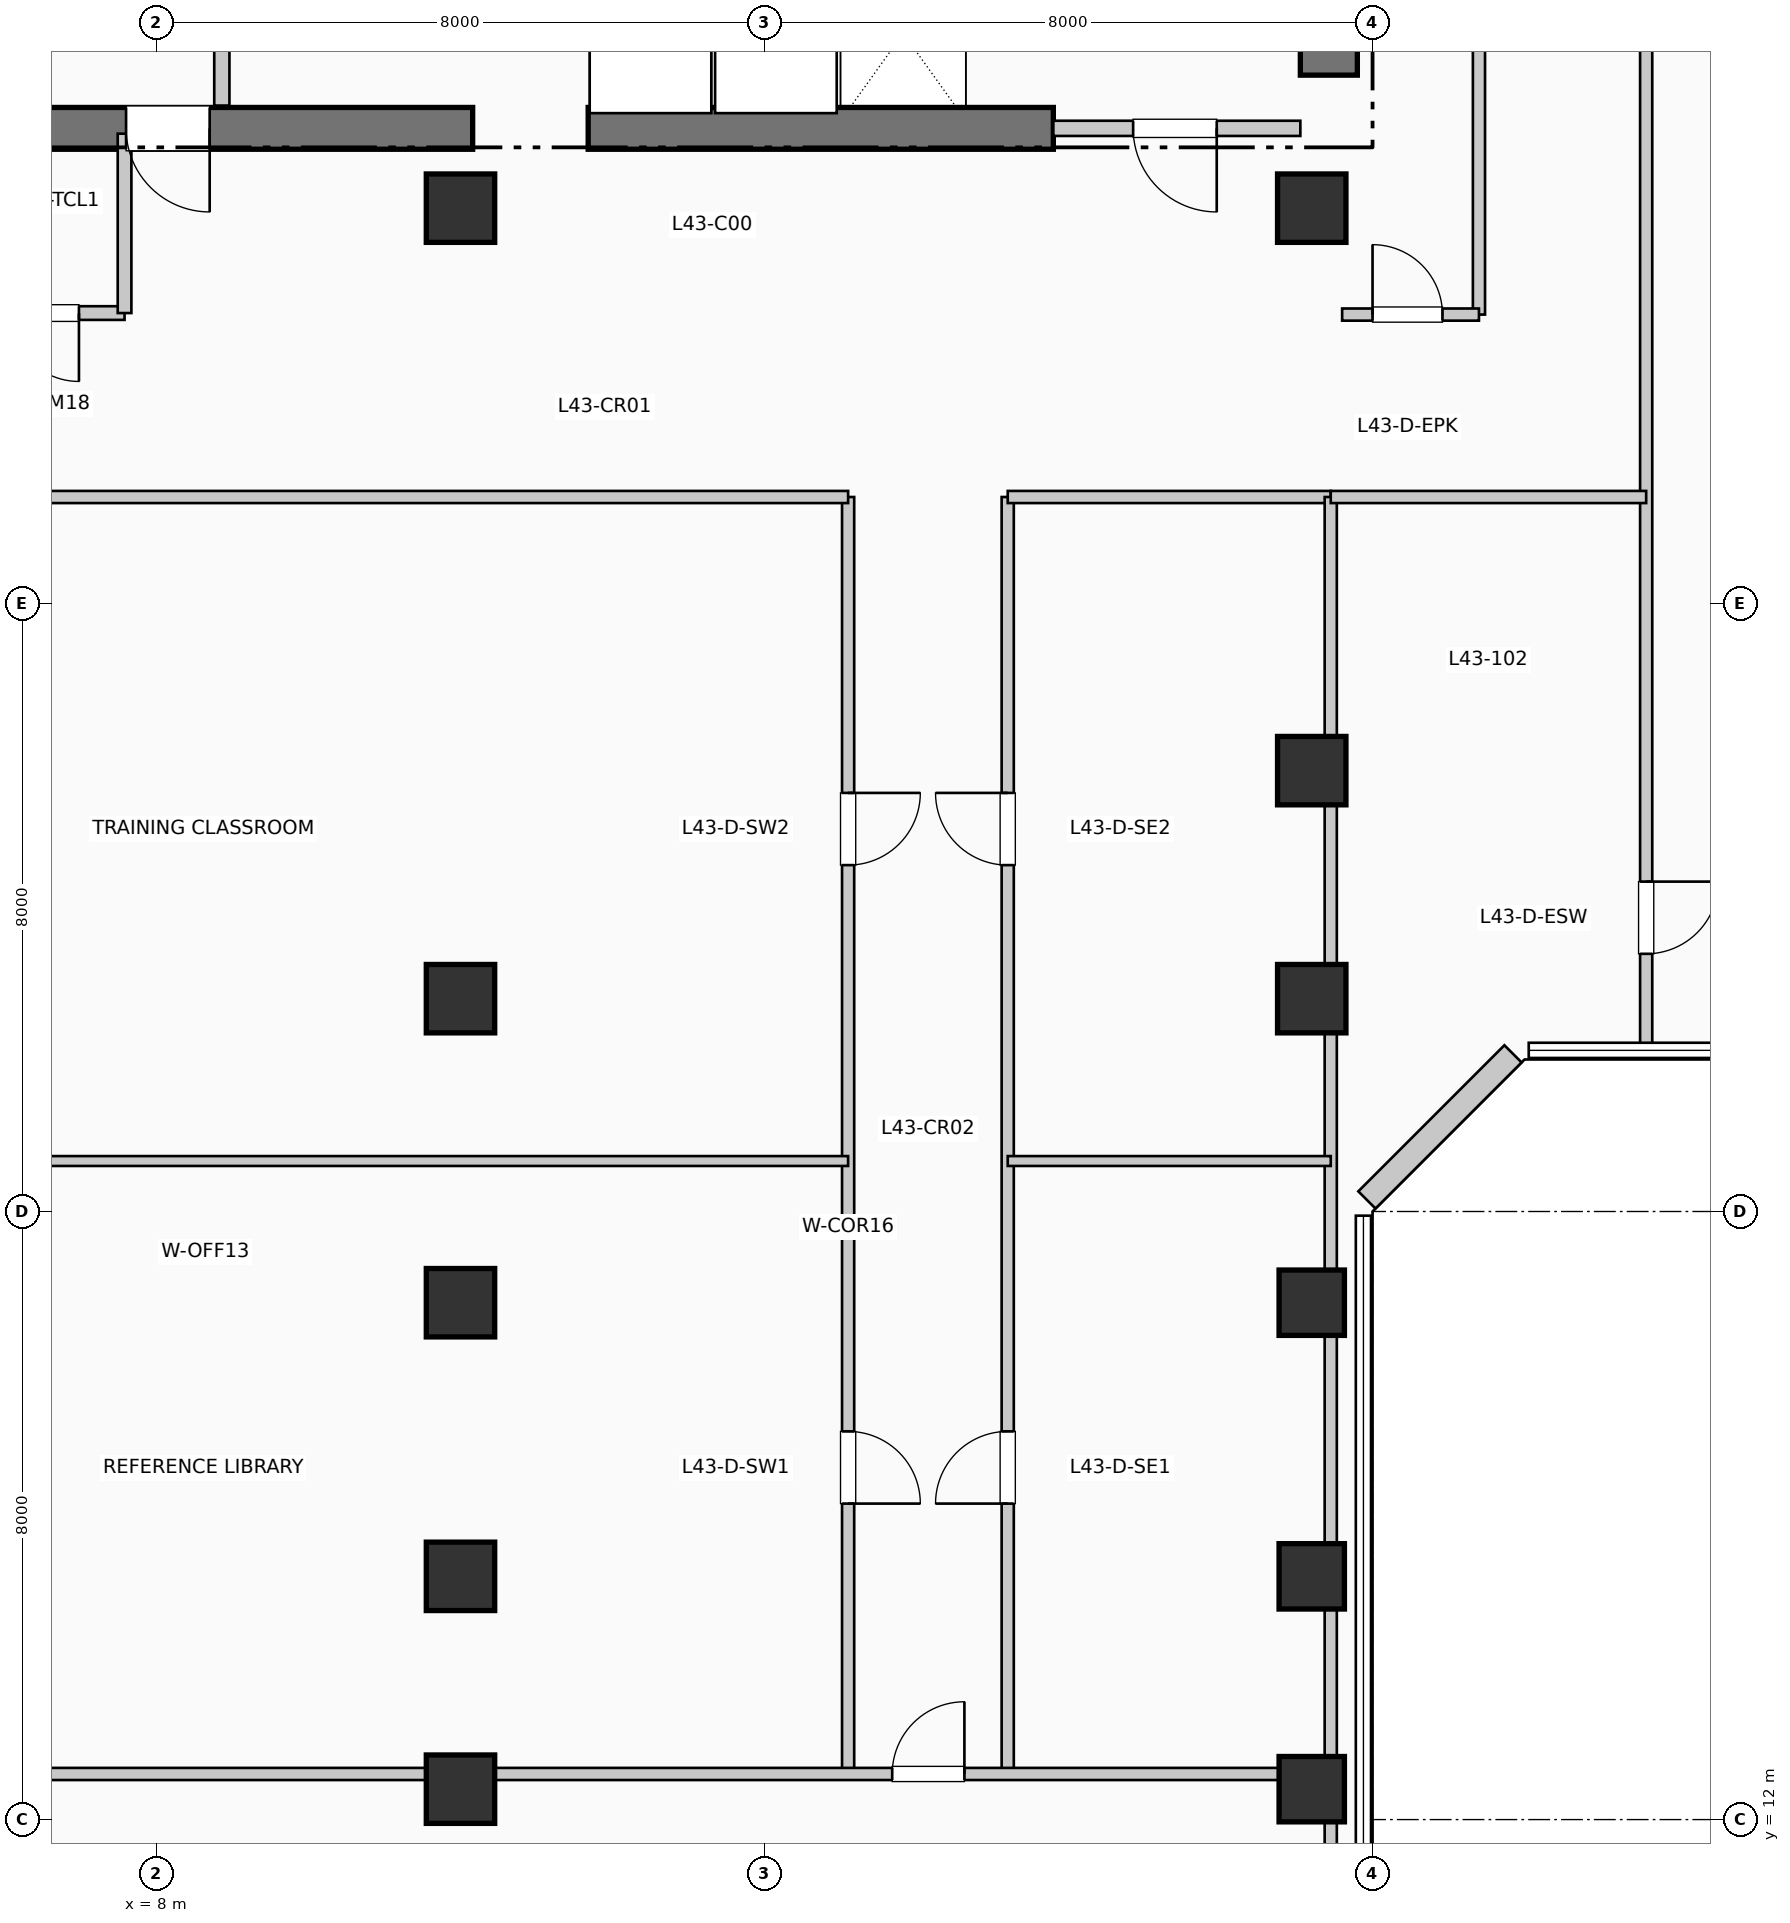
"""IFC4 building model, lengths in metres.
Left out: names, types, materials, properties, quantities, classifications, styles, units other than length and angle.
Written with IfcOpenShell. Run it as: python <this file> out.ifc"""

import sys

from ifc_helpers import new_model, si_unit, direction, frame, frame_2d, origin, origin_2d, place, context, subcontext, project, spatial, rectangle, extrude, element, fill, save


model = new_model("IFC4")
c1 = context("Model", 3, precision=1e-05, world=origin(), true_north=direction((0.0, 1.0)))
c2 = subcontext(c1, "Body", "Model", "MODEL_VIEW")
j1 = project(units=[si_unit("LENGTHUNIT", "METRE"), si_unit("PLANEANGLEUNIT", "RADIAN")], contexts=[c1])
p1 = place(None, origin())
s1 = spatial("IfcSite", under=j1, at=p1, CompositionType="ELEMENT")
p2 = place(p1, origin())
s2 = spatial("IfcBuilding", under=s1, at=p2, CompositionType="ELEMENT")
p3 = place(p2, frame((0.0, 0.0, 179.52)))
s3 = spatial("IfcBuildingStorey", under=s2, at=p3, CompositionType="ELEMENT", Elevation=179.52)
p4 = place(p3, frame((23.425, 34.95, 0.0), z_axis=(0.0, 0.0, 1.0), x_axis=(0.0, 1.0, 0.0)))
e1 = element("IfcWall", 1, at=p4, inside=s3, PredefinedType="SHEAR", context=c2, shape_type="SweptSolid", body=[
    extrude(rectangle(XDim=10.64, YDim=0.75, at=frame_2d((5.32, 0.0))), origin(), (0.0, 0.0, 1.0), 3.96),
])
p5 = place(p3, frame((1.45, 34.25, 0.0), z_axis=(0.0, 0.0, 1.0), x_axis=(1.0, 0.0, 0.0)))
e2 = element("IfcWall", 2, at=p5, inside=s3, PredefinedType="SHEAR", context=c2, shape_type="SweptSolid", body=[
    extrude(rectangle(XDim=10.71, YDim=0.55, at=frame_2d((5.355, 0.0))), origin(), (0.0, 0.0, 1.0), 3.96),
])
p6 = place(p5, frame((7.25, 0.0, 0.0), z_axis=(0.0, 0.0, 1.0), x_axis=(-1.0, 0.0, 0.0)))
e3 = element("IfcOpeningElement", 3, at=p6, cuts=e2, PredefinedType="OPENING", context=c2, shape_type="SweptSolid", body=[
    extrude(rectangle(XDim=1.1, YDim=2.15, at=frame_2d((0.55, 1.075))), frame((0.0, 0.285, 0.0), z_axis=(0.0, -1.0, 0.0), x_axis=(1.0, 0.0, 0.0)), (0.0, 0.0, 1.0), 0.57),
])
p7 = place(p3, frame((13.68, 34.25, 0.0), z_axis=(0.0, 0.0, 1.0), x_axis=(1.0, 0.0, 0.0)))
e4 = element("IfcWall", 4, at=p7, inside=s3, PredefinedType="SHEAR", context=c2, shape_type="SweptSolid", body=[
    extrude(rectangle(XDim=6.12, YDim=0.55, at=frame_2d((3.06, 0.0))), origin(), (0.0, 0.0, 1.0), 3.96),
])
for number, where, z_axis, x_axis in (
    (5, (12.0, 12.4, 0.0), (0.0, 0.0, 1.0), (1.0, 0.0, 0.0)),
    (6, (12.0, 15.2, 0.0), (0.0, 0.0, 1.0), (1.0, 0.0, 0.0)),
    (7, (12.0, 18.8, 0.0), (0.0, 0.0, 1.0), (1.0, 0.0, 0.0)),
    (8, (12.0, 22.8, 0.0), (0.0, 0.0, 1.0), (1.0, 0.0, 0.0)),
    (9, (12.0, 33.2, 0.0), (0.0, 0.0, 1.0), (1.0, 0.0, 0.0)),
):
    element("IfcColumn", number, at=place(p3, frame(where, z_axis=z_axis, x_axis=x_axis)), inside=s3, PredefinedType="COLUMN", context=c2, shape_type="SweptSolid", body=[
        extrude(rectangle(XDim=0.9, YDim=0.9, at=origin_2d()), origin(), (0.0, 0.0, 1.0), 3.96),
    ])
for number, where, z_axis, x_axis in (
    (10, (23.2, 12.4, 0.0), (0.0, 0.0, 1.0), (1.0, 0.0, 0.0)),
    (11, (23.2, 15.2, 0.0), (0.0, 0.0, 1.0), (1.0, 0.0, 0.0)),
    (12, (23.2, 18.8, 0.0), (0.0, 0.0, 1.0), (1.0, 0.0, 0.0)),
):
    element("IfcColumn", number, at=place(p3, frame(where, z_axis=z_axis, x_axis=x_axis)), inside=s3, PredefinedType="COLUMN", context=c2, shape_type="SweptSolid", body=[
        extrude(rectangle(XDim=0.86, YDim=0.86, at=origin_2d()), origin(), (0.0, 0.0, 1.0), 3.96),
    ])
for number, where, z_axis, x_axis in (
    (13, (23.2, 22.8, 0.0), (0.0, 0.0, 1.0), (1.0, 0.0, 0.0)),
    (14, (23.2, 25.8, 0.0), (0.0, 0.0, 1.0), (1.0, 0.0, 0.0)),
    (15, (23.2, 33.2, 0.0), (0.0, 0.0, 1.0), (1.0, 0.0, 0.0)),
):
    element("IfcColumn", number, at=place(p3, frame(where, z_axis=z_axis, x_axis=x_axis)), inside=s3, PredefinedType="COLUMN", context=c2, shape_type="SweptSolid", body=[
        extrude(rectangle(XDim=0.9, YDim=0.9, at=origin_2d()), origin(), (0.0, 0.0, 1.0), 3.96),
    ])
p8 = place(p3, frame((23.926, 20.152, 0.0), z_axis=(0.0, 0.0, 1.0), x_axis=(0.707106781187, 0.707106781187, 0.0)))
e16 = element("IfcWall", 16, at=p8, inside=s3, PredefinedType="SOLIDWALL", context=c2, shape_type="SweptSolid", body=[
    extrude(rectangle(XDim=2.718, YDim=0.32, at=frame_2d((1.359, 0.0))), origin(), (0.0, 0.0, 1.0), 3.71),
])
p9 = place(p3, frame((8.86, 34.55, 0.0), z_axis=(0.0, 0.0, 1.0), x_axis=(0.0, 1.0, 0.0)))
e17 = element("IfcWall", 17, at=p9, inside=s3, PredefinedType="PARTITIONING", context=c2, shape_type="SweptSolid", body=[
    extrude(rectangle(XDim=2.5, YDim=0.2, at=frame_2d((1.25, 0.0))), origin(), (0.0, 0.0, 1.0), 3.71),
])
p10 = place(p3, frame((19.8, 34.25, 0.0), z_axis=(0.0, 0.0, 1.0), x_axis=(1.0, 0.0, 0.0)))
e18 = element("IfcWall", 18, at=p10, inside=s3, PredefinedType="PARTITIONING", context=c2, shape_type="SweptSolid", body=[
    extrude(rectangle(XDim=3.25, YDim=0.2, at=frame_2d((1.625, 0.0))), origin(), (0.0, 0.0, 1.0), 3.71),
])
p11 = place(p10, frame((2.15, 0.0, 0.0), z_axis=(0.0, 0.0, 1.0), x_axis=(-1.0, 0.0, 0.0)))
e19 = element("IfcOpeningElement", 19, at=p11, cuts=e18, PredefinedType="OPENING", context=c2, shape_type="SweptSolid", body=[
    extrude(rectangle(XDim=1.1, YDim=2.15, at=frame_2d((0.55, 1.075))), frame((0.0, 0.11, 0.0), z_axis=(0.0, -1.0, 0.0), x_axis=(1.0, 0.0, 0.0)), (0.0, 0.0, 1.0), 0.22),
])
p12 = place(p3, frame((5.5, 31.82, 0.0), z_axis=(0.0, 0.0, 1.0), x_axis=(1.0, 0.0, 0.0)))
e20 = element("IfcWall", 20, at=p12, inside=s3, PredefinedType="PLUMBINGWALL", context=c2, shape_type="SweptSolid", body=[
    extrude(rectangle(XDim=2.08, YDim=0.18, at=frame_2d((1.04, 0.0))), origin(), (0.0, 0.0, 1.0), 3.71),
])
p13 = place(p12, frame((1.48, 0.0, 0.0), z_axis=(0.0, 0.0, 1.0), x_axis=(-1.0, 0.0, 0.0)))
e21 = element("IfcOpeningElement", 21, at=p13, cuts=e20, PredefinedType="OPENING", context=c2, shape_type="SweptSolid", body=[
    extrude(rectangle(XDim=0.9, YDim=2.1, at=frame_2d((0.45, 1.05))), frame((0.0, 0.1, 0.0), z_axis=(0.0, -1.0, 0.0), x_axis=(1.0, 0.0, 0.0)), (0.0, 0.0, 1.0), 0.2),
])
p14 = place(p3, frame((7.58, 31.82, 0.0), z_axis=(0.0, 0.0, 1.0), x_axis=(0.0, 1.0, 0.0)))
e22 = element("IfcWall", 22, at=p14, inside=s3, PredefinedType="PLUMBINGWALL", context=c2, shape_type="SweptSolid", body=[
    extrude(rectangle(XDim=2.36, YDim=0.18, at=frame_2d((1.18, 0.0))), origin(), (0.0, 0.0, 1.0), 3.71),
])
p15 = place(p3, frame((17.1, 12.6, 0.0), z_axis=(0.0, 0.0, 1.0), x_axis=(0.0, 1.0, 0.0)))
e23 = element("IfcWall", 23, at=p15, inside=s3, PredefinedType="PARTITIONING", context=c2, shape_type="SweptSolid", body=[
    extrude(rectangle(XDim=16.8, YDim=0.16, at=frame_2d((8.4, 0.0))), origin(), (0.0, 0.0, 1.0), 3.71),
])
p16 = place(p15, frame((4.507, 0.0, 0.0), z_axis=(0.0, 0.0, 1.0), x_axis=(-1.0, 0.0, 0.0)))
e24 = element("IfcOpeningElement", 24, at=p16, cuts=e23, PredefinedType="OPENING", context=c2, shape_type="SweptSolid", body=[
    extrude(rectangle(XDim=0.95, YDim=2.15, at=frame_2d((0.475, 1.075))), frame((0.0, 0.09, 0.0), z_axis=(0.0, -1.0, 0.0), x_axis=(1.0, 0.0, 0.0)), (0.0, 0.0, 1.0), 0.18),
])
p17 = place(p15, frame((12.907, 0.0, 0.0), z_axis=(0.0, 0.0, 1.0), x_axis=(-1.0, 0.0, 0.0)))
e25 = element("IfcOpeningElement", 25, at=p17, cuts=e23, PredefinedType="OPENING", context=c2, shape_type="SweptSolid", body=[
    extrude(rectangle(XDim=0.95, YDim=2.15, at=frame_2d((0.475, 1.075))), frame((0.0, 0.09, 0.0), z_axis=(0.0, -1.0, 0.0), x_axis=(1.0, 0.0, 0.0)), (0.0, 0.0, 1.0), 0.18),
])
p18 = place(p3, frame((19.2, 12.6, 0.0), z_axis=(0.0, 0.0, 1.0), x_axis=(0.0, 1.0, 0.0)))
e26 = element("IfcWall", 26, at=p18, inside=s3, PredefinedType="PARTITIONING", context=c2, shape_type="SweptSolid", body=[
    extrude(rectangle(XDim=16.8, YDim=0.16, at=frame_2d((8.4, 0.0))), origin(), (0.0, 0.0, 1.0), 3.71),
])
p19 = place(p18, frame((3.557, 0.0, 0.0)))
e27 = element("IfcOpeningElement", 27, at=p19, cuts=e26, PredefinedType="OPENING", context=c2, shape_type="SweptSolid", body=[
    extrude(rectangle(XDim=0.95, YDim=2.15, at=frame_2d((0.475, 1.075))), frame((0.0, 0.09, 0.0), z_axis=(0.0, -1.0, 0.0), x_axis=(1.0, 0.0, 0.0)), (0.0, 0.0, 1.0), 0.18),
])
p20 = place(p18, frame((11.957, 0.0, 0.0)))
e28 = element("IfcOpeningElement", 28, at=p20, cuts=e26, PredefinedType="OPENING", context=c2, shape_type="SweptSolid", body=[
    extrude(rectangle(XDim=0.95, YDim=2.15, at=frame_2d((0.475, 1.075))), frame((0.0, 0.09, 0.0), z_axis=(0.0, -1.0, 0.0), x_axis=(1.0, 0.0, 0.0)), (0.0, 0.0, 1.0), 0.18),
])
p21 = place(p3, frame((0.19, 12.6, 0.0), z_axis=(0.0, 0.0, 1.0), x_axis=(1.0, 0.0, 0.0)))
e29 = element("IfcWall", 29, at=p21, inside=s3, PredefinedType="PARTITIONING", context=c2, shape_type="SweptSolid", body=[
    extrude(rectangle(XDim=23.26, YDim=0.16, at=frame_2d((11.63, 0.0))), origin(), (0.0, 0.0, 1.0), 3.045),
])
p22 = place(p21, frame((17.49, 0.0, 0.0)))
e30 = element("IfcOpeningElement", 30, at=p22, cuts=e29, PredefinedType="OPENING", context=c2, shape_type="SweptSolid", body=[
    extrude(rectangle(XDim=0.95, YDim=2.15, at=frame_2d((0.475, 1.075))), frame((0.0, 0.09, 0.0), z_axis=(0.0, -1.0, 0.0), x_axis=(1.0, 0.0, 0.0)), (0.0, 0.0, 1.0), 0.18),
])
p23 = place(p3, frame((0.19, 29.4, 0.0), z_axis=(0.0, 0.0, 1.0), x_axis=(1.0, 0.0, 0.0)))
e31 = element("IfcWall", 31, at=p23, inside=s3, PredefinedType="PARTITIONING", context=c2, shape_type="SweptSolid", body=[
    extrude(rectangle(XDim=16.91, YDim=0.16, at=frame_2d((8.455, 0.0))), origin(), (0.0, 0.0, 1.0), 3.365),
])
p24 = place(p3, frame((19.2, 29.4, 0.0), z_axis=(0.0, 0.0, 1.0), x_axis=(1.0, 0.0, 0.0)))
e32 = element("IfcWall", 32, at=p24, inside=s3, PredefinedType="PARTITIONING", context=c2, shape_type="SweptSolid", body=[
    extrude(rectangle(XDim=4.25, YDim=0.16, at=frame_2d((2.125, 0.0))), origin(), (0.0, 0.0, 1.0), 3.71),
])
p25 = place(p3, frame((23.45, 0.19, 0.0), z_axis=(0.0, 0.0, 1.0), x_axis=(0.0, 1.0, 0.0)))
e33 = element("IfcWall", 33, at=p25, inside=s3, PredefinedType="PARTITIONING", context=c2, shape_type="SweptSolid", body=[
    extrude(rectangle(XDim=29.21, YDim=0.16, at=frame_2d((14.605, 0.0))), origin(), (0.0, 0.0, 1.0), 3.045),
])
p26 = place(p3, frame((0.19, 20.664, 0.0), z_axis=(0.0, 0.0, 1.0), x_axis=(1.0, 0.0, 0.0)))
e34 = element("IfcWall", 34, at=p26, inside=s3, PredefinedType="PARTITIONING", context=c2, shape_type="SweptSolid", body=[
    extrude(rectangle(XDim=16.91, YDim=0.13, at=frame_2d((8.455, 0.0))), origin(), (0.0, 0.0, 1.0), 3.71),
])
p27 = place(p3, frame((19.2, 20.664, 0.0), z_axis=(0.0, 0.0, 1.0), x_axis=(1.0, 0.0, 0.0)))
e35 = element("IfcWall", 35, at=p27, inside=s3, PredefinedType="PARTITIONING", context=c2, shape_type="SweptSolid", body=[
    extrude(rectangle(XDim=4.25, YDim=0.13, at=frame_2d((2.125, 0.0))), origin(), (0.0, 0.0, 1.0), 3.71),
])
p28 = place(p3, frame((25.4, 31.8, 0.0), z_axis=(0.0, 0.0, 1.0), x_axis=(0.0, 1.0, 0.0)))
e36 = element("IfcWall", 36, at=p28, inside=s3, PredefinedType="PARTITIONING", context=c2, shape_type="SweptSolid", body=[
    extrude(rectangle(XDim=14.01, YDim=0.16, at=frame_2d((7.005, 0.0))), origin(), (0.0, 0.0, 1.0), 3.71),
])
p29 = place(p3, frame((27.6, 22.19, 0.0), z_axis=(0.0, 0.0, 1.0), x_axis=(0.0, 1.0, 0.0)))
e37 = element("IfcWall", 37, at=p29, inside=s3, PredefinedType="PARTITIONING", context=c2, shape_type="SweptSolid", body=[
    extrude(rectangle(XDim=15.01, YDim=0.16, at=frame_2d((7.505, 0.0))), origin(), (0.0, 0.0, 1.0), 3.71),
])
p30 = place(p29, frame((2.15, 0.0, 0.0), z_axis=(0.0, 0.0, 1.0), x_axis=(-1.0, 0.0, 0.0)))
e38 = element("IfcOpeningElement", 38, at=p30, cuts=e37, PredefinedType="OPENING", context=c2, shape_type="SweptSolid", body=[
    extrude(rectangle(XDim=0.95, YDim=2.15, at=frame_2d((0.475, 1.075))), frame((0.0, 0.09, 0.0), z_axis=(0.0, -1.0, 0.0), x_axis=(1.0, 0.0, 0.0)), (0.0, 0.0, 1.0), 0.18),
])
p31 = place(p3, frame((23.45, 29.4, 0.0), z_axis=(0.0, 0.0, 1.0), x_axis=(1.0, 0.0, 0.0)))
e39 = element("IfcWall", 39, at=p31, inside=s3, PredefinedType="PARTITIONING", context=c2, shape_type="SweptSolid", body=[
    extrude(rectangle(XDim=4.15, YDim=0.16, at=frame_2d((2.075, 0.0))), origin(), (0.0, 0.0, 1.0), 3.365),
])
p32 = place(p3, frame((23.6, 31.8, 0.0), z_axis=(0.0, 0.0, 1.0), x_axis=(1.0, 0.0, 0.0)))
e40 = element("IfcWall", 40, at=p32, inside=s3, PredefinedType="PARTITIONING", context=c2, shape_type="SweptSolid", body=[
    extrude(rectangle(XDim=1.8, YDim=0.16, at=frame_2d((0.9, 0.0))), origin(), (0.0, 0.0, 1.0), 3.71),
])
p33 = place(p32, frame((0.4, 0.0, 0.0)))
e41 = element("IfcOpeningElement", 41, at=p33, cuts=e40, PredefinedType="OPENING", context=c2, shape_type="SweptSolid", body=[
    extrude(rectangle(XDim=0.92, YDim=2.1, at=frame_2d((0.46, 1.05))), frame((0.0, 0.09, 0.0), z_axis=(0.0, -1.0, 0.0), x_axis=(1.0, 0.0, 0.0)), (0.0, 0.0, 1.0), 0.18),
])
p34 = place(p6, origin())
e42 = element("IfcDoor", 42, at=p34, inside=s3, OperationType="SINGLE_SWING_RIGHT", PredefinedType="DOOR", context=c2, shape_type="SweptSolid", body=[
    extrude(rectangle(XDim=1.1, YDim=2.15, at=frame_2d((0.55, 1.075))), frame((0.0, 0.025, 0.0), z_axis=(0.0, -1.0, 0.0), x_axis=(1.0, 0.0, 0.0)), (0.0, 0.0, 1.0), 0.05),
])
fill(e3, e42)
p35 = place(p11, origin())
e43 = element("IfcDoor", 43, at=p35, inside=s3, OperationType="SINGLE_SWING_RIGHT", PredefinedType="DOOR", context=c2, shape_type="SweptSolid", body=[
    extrude(rectangle(XDim=1.1, YDim=2.15, at=frame_2d((0.55, 1.075))), frame((0.0, 0.025, 0.0), z_axis=(0.0, -1.0, 0.0), x_axis=(1.0, 0.0, 0.0)), (0.0, 0.0, 1.0), 0.05),
])
fill(e19, e43)
p36 = place(p13, origin())
e44 = element("IfcDoor", 44, at=p36, inside=s3, OperationType="SINGLE_SWING_RIGHT", PredefinedType="DOOR", context=c2, shape_type="SweptSolid", body=[
    extrude(rectangle(XDim=0.9, YDim=2.1, at=frame_2d((0.45, 1.05))), frame((0.0, 0.025, 0.0), z_axis=(0.0, -1.0, 0.0), x_axis=(1.0, 0.0, 0.0)), (0.0, 0.0, 1.0), 0.05),
])
fill(e21, e44)
p37 = place(p22, origin())
e45 = element("IfcDoor", 45, at=p37, inside=s3, OperationType="SINGLE_SWING_RIGHT", PredefinedType="DOOR", context=c2, shape_type="SweptSolid", body=[
    extrude(rectangle(XDim=0.95, YDim=2.15, at=frame_2d((0.475, 1.075))), frame((0.0, 0.025, 0.0), z_axis=(0.0, -1.0, 0.0), x_axis=(1.0, 0.0, 0.0)), (0.0, 0.0, 1.0), 0.05),
])
fill(e30, e45)
p38 = place(p16, origin())
e46 = element("IfcDoor", 46, at=p38, inside=s3, OperationType="SINGLE_SWING_LEFT", PredefinedType="DOOR", context=c2, shape_type="SweptSolid", body=[
    extrude(rectangle(XDim=0.95, YDim=2.15, at=frame_2d((0.475, 1.075))), frame((0.0, 0.025, 0.0), z_axis=(0.0, -1.0, 0.0), x_axis=(1.0, 0.0, 0.0)), (0.0, 0.0, 1.0), 0.05),
])
fill(e24, e46)
p39 = place(p17, origin())
e47 = element("IfcDoor", 47, at=p39, inside=s3, OperationType="SINGLE_SWING_RIGHT", PredefinedType="DOOR", context=c2, shape_type="SweptSolid", body=[
    extrude(rectangle(XDim=0.95, YDim=2.15, at=frame_2d((0.475, 1.075))), frame((0.0, 0.025, 0.0), z_axis=(0.0, -1.0, 0.0), x_axis=(1.0, 0.0, 0.0)), (0.0, 0.0, 1.0), 0.05),
])
fill(e25, e47)
p40 = place(p19, origin())
e48 = element("IfcDoor", 48, at=p40, inside=s3, OperationType="SINGLE_SWING_LEFT", PredefinedType="DOOR", context=c2, shape_type="SweptSolid", body=[
    extrude(rectangle(XDim=0.95, YDim=2.15, at=frame_2d((0.475, 1.075))), frame((0.0, 0.025, 0.0), z_axis=(0.0, -1.0, 0.0), x_axis=(1.0, 0.0, 0.0)), (0.0, 0.0, 1.0), 0.05),
])
fill(e27, e48)
p41 = place(p20, origin())
e49 = element("IfcDoor", 49, at=p41, inside=s3, OperationType="SINGLE_SWING_RIGHT", PredefinedType="DOOR", context=c2, shape_type="SweptSolid", body=[
    extrude(rectangle(XDim=0.95, YDim=2.15, at=frame_2d((0.475, 1.075))), frame((0.0, 0.025, 0.0), z_axis=(0.0, -1.0, 0.0), x_axis=(1.0, 0.0, 0.0)), (0.0, 0.0, 1.0), 0.05),
])
fill(e28, e49)
p42 = place(p33, origin())
e50 = element("IfcDoor", 50, at=p42, inside=s3, OperationType="SINGLE_SWING_LEFT", PredefinedType="DOOR", context=c2, shape_type="SweptSolid", body=[
    extrude(rectangle(XDim=0.92, YDim=2.1, at=frame_2d((0.46, 1.05))), frame((0.0, 0.025, 0.0), z_axis=(0.0, -1.0, 0.0), x_axis=(1.0, 0.0, 0.0)), (0.0, 0.0, 1.0), 0.05),
])
fill(e41, e50)
p43 = place(p30, origin())
e51 = element("IfcDoor", 51, at=p43, inside=s3, OperationType="SINGLE_SWING_RIGHT", PredefinedType="DOOR", context=c2, shape_type="SweptSolid", body=[
    extrude(rectangle(XDim=0.95, YDim=2.15, at=frame_2d((0.475, 1.075))), frame((0.0, 0.025, 0.0), z_axis=(0.0, -1.0, 0.0), x_axis=(1.0, 0.0, 0.0)), (0.0, 0.0, 1.0), 0.05),
])
fill(e38, e51)
save(model, sys.argv[1])
